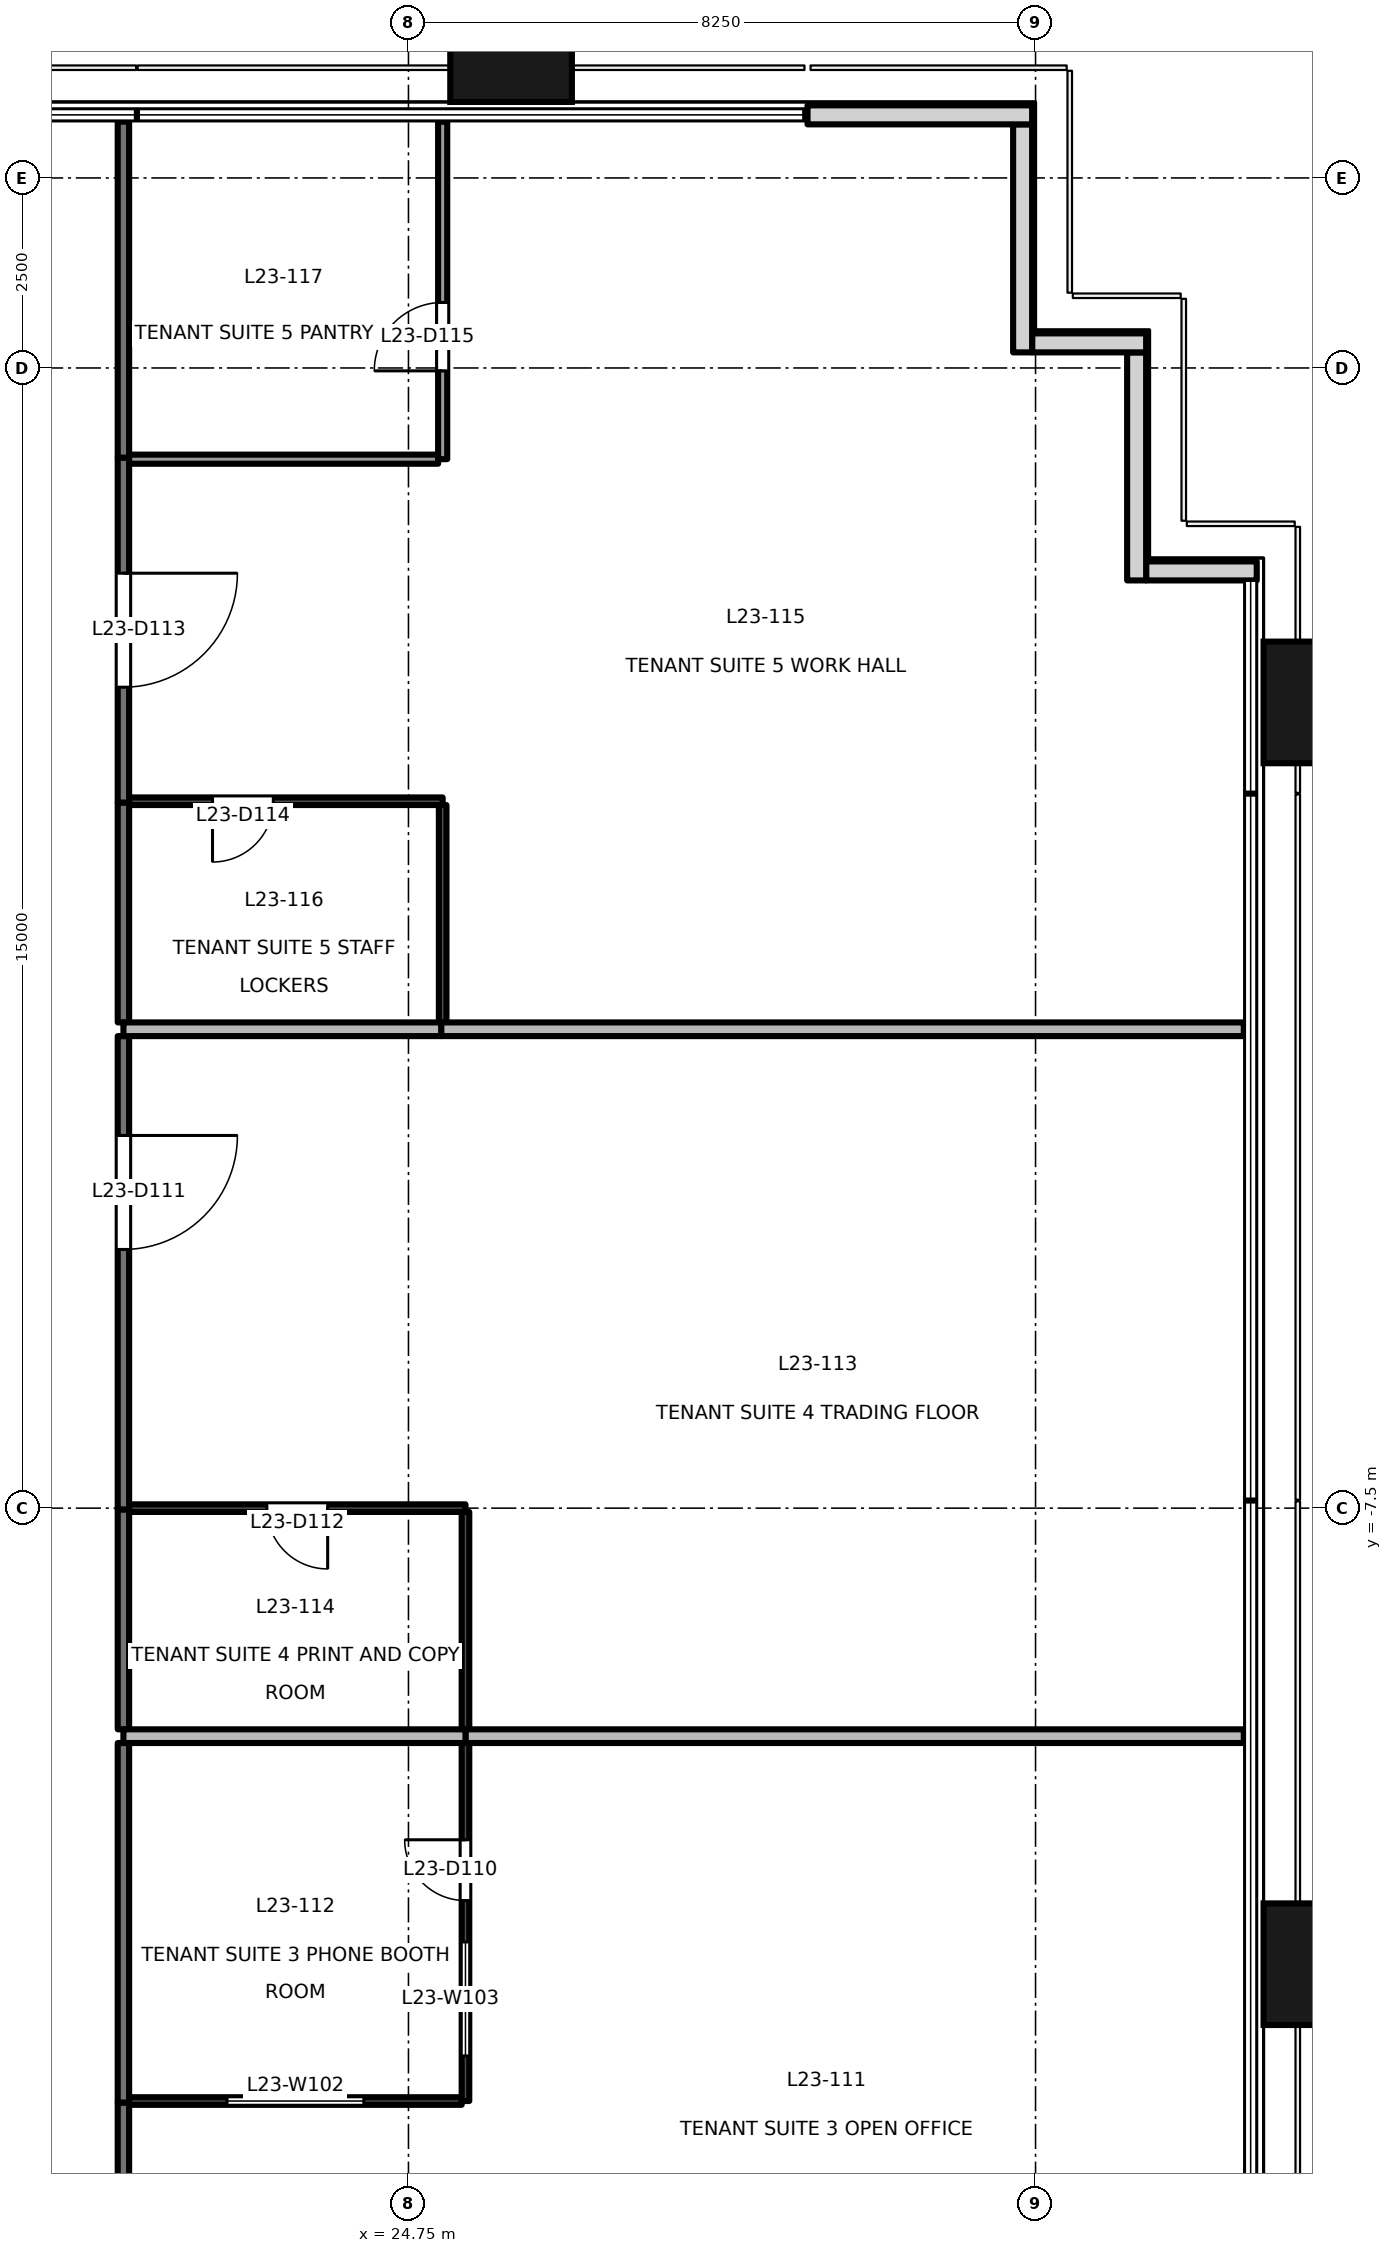
"""IFC4 building model, lengths in metres.
Left out: names, types, materials, properties, quantities, classifications, styles, units other than length and angle.
Written with IfcOpenShell. Run it as: python <this file> out.ifc"""

import sys

from ifc_helpers import new_model, si_unit, direction, frame, frame_2d, origin, origin_2d, place, context, subcontext, project, spatial, rectangle, extrude, element, fill, save


model = new_model("IFC4")
c1 = context("Model", 3, precision=1e-05, world=origin(), true_north=direction((0.0, 1.0)))
c2 = subcontext(c1, "Body", "Model", "MODEL_VIEW")
j1 = project(units=[si_unit("LENGTHUNIT", "METRE"), si_unit("PLANEANGLEUNIT", "RADIAN")], contexts=[c1])
p1 = place(None, origin())
s1 = spatial("IfcSite", under=j1, at=p1, CompositionType="ELEMENT")
p2 = place(p1, origin())
s2 = spatial("IfcBuilding", under=s1, at=p2, CompositionType="ELEMENT")
p3 = place(p2, frame((0.0, 0.0, 103.7)))
s3 = spatial("IfcBuildingStorey", under=s2, at=p3, CompositionType="ELEMENT", Elevation=103.7)
for number, where, z_axis, x_axis in (
    (1, (36.9, -13.5, -0.2), (0.0, 0.0, 1.0), (0.0, 1.0, 0.0)),
    (2, (36.9, 3.1, -0.2), (0.0, 0.0, 1.0), (0.0, 1.0, 0.0)),
    (3, (26.1, 11.9, -0.2), (0.0, 0.0, 1.0), (1.0, 0.0, 0.0)),
):
    element("IfcColumn", number, at=place(p3, frame(where, z_axis=z_axis, x_axis=x_axis)), inside=s3, PredefinedType="COLUMN", context=c2, shape_type="SweptSolid", body=[
        extrude(rectangle(XDim=1.6, YDim=1.8, at=origin_2d()), origin(), (0.0, 0.0, 1.0), 4.0),
    ])
p4 = place(p3, frame((35.91, 4.83, 0.0), z_axis=(0.0, 0.0, 1.0), x_axis=(-1.0, 0.0, 0.0)))
e4 = element("IfcWall", 4, at=p4, inside=s3, PredefinedType="SOLIDWALL", context=c2, shape_type="SweptSolid", body=[
    extrude(rectangle(XDim=1.455, YDim=0.25, at=frame_2d((0.728, 0.0))), origin(), (0.0, 0.0, 1.0), 3.8),
])
p5 = place(p3, frame((34.33, 4.705, 0.0), z_axis=(0.0, 0.0, 1.0), x_axis=(0.0, 1.0, 0.0)))
e5 = element("IfcWall", 5, at=p5, inside=s3, PredefinedType="SOLIDWALL", context=c2, shape_type="SweptSolid", body=[
    extrude(rectangle(XDim=3.0, YDim=0.25, at=frame_2d((1.5, 0.0))), origin(), (0.0, 0.0, 1.0), 3.8),
])
p6 = place(p3, frame((34.455, 7.83, 0.0), z_axis=(0.0, 0.0, 1.0), x_axis=(-1.0, 0.0, 0.0)))
e6 = element("IfcWall", 6, at=p6, inside=s3, PredefinedType="SOLIDWALL", context=c2, shape_type="SweptSolid", body=[
    extrude(rectangle(XDim=1.5, YDim=0.25, at=frame_2d((0.75, 0.0))), origin(), (0.0, 0.0, 1.0), 3.8),
])
p7 = place(p3, frame((32.83, 7.705, 0.0), z_axis=(0.0, 0.0, 1.0), x_axis=(0.0, 1.0, 0.0)))
e7 = element("IfcWall", 7, at=p7, inside=s3, PredefinedType="SOLIDWALL", context=c2, shape_type="SweptSolid", body=[
    extrude(rectangle(XDim=3.0, YDim=0.25, at=frame_2d((1.5, 0.0))), origin(), (0.0, 0.0, 1.0), 3.8),
])
p8 = place(p3, frame((32.955, 10.83, 0.0), z_axis=(0.0, 0.0, 1.0), x_axis=(-1.0, 0.0, 0.0)))
e8 = element("IfcWall", 8, at=p8, inside=s3, PredefinedType="SOLIDWALL", context=c2, shape_type="SweptSolid", body=[
    extrude(rectangle(XDim=2.955, YDim=0.25, at=frame_2d((1.478, 0.0))), origin(), (0.0, 0.0, 1.0), 3.8),
])
p9 = place(p3, frame((21.0, -15.32, 0.0), z_axis=(0.0, 0.0, 1.0), x_axis=(0.0, -1.0, 0.0)))
e9 = element("IfcWall", 9, at=p9, inside=s3, PredefinedType="PARTITIONING", context=c2, shape_type="SweptSolid", body=[
    extrude(rectangle(XDim=4.39, YDim=0.15, at=frame_2d((2.195, 0.0))), origin(), (0.0, 0.0, 1.0), 3.8),
])
p10 = place(p9, frame((1.745, 0.0, 0.0)))
e10 = element("IfcOpeningElement", 10, at=p10, cuts=e9, PredefinedType="OPENING", context=c2, shape_type="SweptSolid", body=[
    extrude(rectangle(XDim=0.9, YDim=2.1, at=frame_2d((0.45, 1.05))), frame((0.0, 0.085, 0.0), z_axis=(0.0, -1.0, 0.0), x_axis=(1.0, 0.0, 0.0)), (0.0, 0.0, 1.0), 0.171),
])
p11 = place(p3, frame((21.0, -10.59, 0.0), z_axis=(0.0, 0.0, 1.0), x_axis=(0.0, -1.0, 0.0)))
e11 = element("IfcWall", 11, at=p11, inside=s3, PredefinedType="PARTITIONING", context=c2, shape_type="SweptSolid", body=[
    extrude(rectangle(XDim=4.73, YDim=0.15, at=frame_2d((2.365, 0.0))), origin(), (0.0, 0.0, 1.0), 2.9),
])
p12 = place(p3, frame((21.0, -1.29, 0.0), z_axis=(0.0, 0.0, 1.0), x_axis=(0.0, -1.0, 0.0)))
e12 = element("IfcWall", 12, at=p12, inside=s3, PredefinedType="PARTITIONING", context=c2, shape_type="SweptSolid", body=[
    extrude(rectangle(XDim=6.23, YDim=0.15, at=frame_2d((3.115, 0.0))), origin(), (0.0, 0.0, 1.0), 2.9),
])
p13 = place(p12, frame((1.307, 0.0, 0.0)))
e13 = element("IfcOpeningElement", 13, at=p13, cuts=e12, PredefinedType="OPENING", context=c2, shape_type="SweptSolid", body=[
    extrude(rectangle(XDim=1.5, YDim=2.1, at=frame_2d((0.75, 1.05))), frame((0.0, 0.085, 0.0), z_axis=(0.0, -1.0, 0.0), x_axis=(1.0, 0.0, 0.0)), (0.0, 0.0, 1.0), 0.171),
])
p14 = place(p3, frame((21.0, -7.52, 0.0), z_axis=(0.0, 0.0, 1.0), x_axis=(0.0, -1.0, 0.0)))
e14 = element("IfcWall", 14, at=p14, inside=s3, PredefinedType="PARTITIONING", context=c2, shape_type="SweptSolid", body=[
    extrude(rectangle(XDim=2.89, YDim=0.15, at=frame_2d((1.445, 0.0))), origin(), (0.0, 0.0, 1.0), 2.9),
])
p15 = place(p3, frame((21.0, 6.32, 0.0), z_axis=(0.0, 0.0, 1.0), x_axis=(0.0, -1.0, 0.0)))
e15 = element("IfcWall", 15, at=p15, inside=s3, PredefinedType="PARTITIONING", context=c2, shape_type="SweptSolid", body=[
    extrude(rectangle(XDim=4.54, YDim=0.15, at=frame_2d((2.27, 0.0))), origin(), (0.0, 0.0, 1.0), 2.9),
])
p16 = place(p15, frame((1.52, 0.0, 0.0)))
e16 = element("IfcOpeningElement", 16, at=p16, cuts=e15, PredefinedType="OPENING", context=c2, shape_type="SweptSolid", body=[
    extrude(rectangle(XDim=1.5, YDim=2.1, at=frame_2d((0.75, 1.05))), frame((0.0, 0.085, 0.0), z_axis=(0.0, -1.0, 0.0), x_axis=(1.0, 0.0, 0.0)), (0.0, 0.0, 1.0), 0.171),
])
p17 = place(p3, frame((21.0, 1.78, 0.0), z_axis=(0.0, 0.0, 1.0), x_axis=(0.0, -1.0, 0.0)))
e17 = element("IfcWall", 17, at=p17, inside=s3, PredefinedType="PARTITIONING", context=c2, shape_type="SweptSolid", body=[
    extrude(rectangle(XDim=2.89, YDim=0.15, at=frame_2d((1.445, 0.0))), origin(), (0.0, 0.0, 1.0), 2.9),
])
p18 = place(p3, frame((21.0, 10.74, 0.0), z_axis=(0.0, 0.0, 1.0), x_axis=(0.0, -1.0, 0.0)))
e18 = element("IfcWall", 18, at=p18, inside=s3, PredefinedType="PARTITIONING", context=c2, shape_type="SweptSolid", body=[
    extrude(rectangle(XDim=4.42, YDim=0.15, at=frame_2d((2.21, 0.0))), origin(), (0.0, 0.0, 1.0), 3.8),
])
p19 = place(p3, frame((21.075, -15.3, 0.0), z_axis=(0.0, 0.0, 1.0), x_axis=(1.0, 0.0, 0.0)))
e19 = element("IfcWall", 19, at=p19, inside=s3, PredefinedType="PARTITIONING", context=c2, shape_type="SweptSolid", body=[
    extrude(rectangle(XDim=4.375, YDim=0.1, at=frame_2d((2.188, 0.0))), origin(), (0.0, 0.0, 1.0), 3.8),
])
p20 = place(p19, frame((1.288, 0.0, 0.9)))
e20 = element("IfcOpeningElement", 20, at=p20, cuts=e19, PredefinedType="OPENING", context=c2, shape_type="SweptSolid", body=[
    extrude(rectangle(XDim=1.8, YDim=1.2, at=frame_2d((0.9, 0.6))), frame((0.0, 0.061, 0.0), z_axis=(0.0, -1.0, 0.0), x_axis=(1.0, 0.0, 0.0)), (0.0, 0.0, 1.0), 0.121),
])
p21 = place(p3, frame((25.5, -15.3, 0.0), z_axis=(0.0, 0.0, 1.0), x_axis=(0.0, 1.0, 0.0)))
e21 = element("IfcWall", 21, at=p21, inside=s3, PredefinedType="PARTITIONING", context=c2, shape_type="SweptSolid", body=[
    extrude(rectangle(XDim=4.71, YDim=0.1, at=frame_2d((2.355, 0.0))), origin(), (0.0, 0.0, 1.0), 2.9),
])
p22 = place(p21, frame((2.637, 0.0, 0.0)))
e22 = element("IfcOpeningElement", 22, at=p22, cuts=e21, PredefinedType="OPENING", context=c2, shape_type="SweptSolid", body=[
    extrude(rectangle(XDim=0.8, YDim=2.1, at=frame_2d((0.4, 1.05))), frame((0.0, 0.061, 0.0), z_axis=(0.0, -1.0, 0.0), x_axis=(1.0, 0.0, 0.0)), (0.0, 0.0, 1.0), 0.121),
])
p23 = place(p21, frame((0.593, 0.0, 0.9)))
e23 = element("IfcOpeningElement", 23, at=p23, cuts=e21, PredefinedType="OPENING", context=c2, shape_type="SweptSolid", body=[
    extrude(rectangle(XDim=1.5, YDim=1.2, at=frame_2d((0.75, 0.6))), frame((0.0, 0.061, 0.0), z_axis=(0.0, -1.0, 0.0), x_axis=(1.0, 0.0, 0.0)), (0.0, 0.0, 1.0), 0.121),
])
p24 = place(p3, frame((25.5, -10.5, 0.0), z_axis=(0.0, 0.0, 1.0), x_axis=(1.0, 0.0, 0.0)))
e24 = element("IfcWall", 24, at=p24, inside=s3, PredefinedType="PARTITIONING", context=c2, shape_type="SweptSolid", body=[
    extrude(rectangle(XDim=10.24, YDim=0.18, at=frame_2d((5.12, 0.0))), origin(), (0.0, 0.0, 1.0), 3.8),
])
p25 = place(p3, frame((21.0, -10.5, 0.0), z_axis=(0.0, 0.0, 1.0), x_axis=(1.0, 0.0, 0.0)))
e25 = element("IfcWall", 25, at=p25, inside=s3, PredefinedType="PARTITIONING", context=c2, shape_type="SweptSolid", body=[
    extrude(rectangle(XDim=4.5, YDim=0.18, at=frame_2d((2.25, 0.0))), origin(), (0.0, 0.0, 1.0), 3.8),
])
p26 = place(p3, frame((25.5, -7.5, 0.0), z_axis=(0.0, 0.0, 1.0), x_axis=(-1.0, 0.0, 0.0)))
e26 = element("IfcWall", 26, at=p26, inside=s3, PredefinedType="PARTITIONING", context=c2, shape_type="SweptSolid", body=[
    extrude(rectangle(XDim=4.425, YDim=0.1, at=frame_2d((2.212, 0.0))), origin(), (0.0, 0.0, 1.0), 3.8),
])
p27 = place(p26, frame((1.813, 0.0, 0.0)))
e27 = element("IfcOpeningElement", 27, at=p27, cuts=e26, PredefinedType="OPENING", context=c2, shape_type="SweptSolid", body=[
    extrude(rectangle(XDim=0.8, YDim=2.1, at=frame_2d((0.4, 1.05))), frame((0.0, 0.061, 0.0), z_axis=(0.0, -1.0, 0.0), x_axis=(1.0, 0.0, 0.0)), (0.0, 0.0, 1.0), 0.121),
])
p28 = place(p3, frame((25.5, -10.41, 0.0), z_axis=(0.0, 0.0, 1.0), x_axis=(0.0, 1.0, 0.0)))
e28 = element("IfcWall", 28, at=p28, inside=s3, PredefinedType="PARTITIONING", context=c2, shape_type="SweptSolid", body=[
    extrude(rectangle(XDim=2.86, YDim=0.1, at=frame_2d((1.43, 0.0))), origin(), (0.0, 0.0, 1.0), 2.9),
])
p29 = place(p3, frame((25.18, -1.2, 0.0), z_axis=(0.0, 0.0, 1.0), x_axis=(1.0, 0.0, 0.0)))
e29 = element("IfcWall", 29, at=p29, inside=s3, PredefinedType="PARTITIONING", context=c2, shape_type="SweptSolid", body=[
    extrude(rectangle(XDim=10.56, YDim=0.18, at=frame_2d((5.28, 0.0))), origin(), (0.0, 0.0, 1.0), 3.8),
])
p30 = place(p3, frame((21.0, -1.2, 0.0), z_axis=(0.0, 0.0, 1.0), x_axis=(1.0, 0.0, 0.0)))
e30 = element("IfcWall", 30, at=p30, inside=s3, PredefinedType="PARTITIONING", context=c2, shape_type="SweptSolid", body=[
    extrude(rectangle(XDim=4.18, YDim=0.18, at=frame_2d((2.09, 0.0))), origin(), (0.0, 0.0, 1.0), 3.8),
])
p31 = place(p3, frame((25.2, 1.8, 0.0), z_axis=(0.0, 0.0, 1.0), x_axis=(-1.0, 0.0, 0.0)))
e31 = element("IfcWall", 31, at=p31, inside=s3, PredefinedType="PARTITIONING", context=c2, shape_type="SweptSolid", body=[
    extrude(rectangle(XDim=4.125, YDim=0.1, at=frame_2d((2.062, 0.0))), origin(), (0.0, 0.0, 1.0), 3.8),
])
p32 = place(p31, frame((2.228, 0.0, 0.0)))
e32 = element("IfcOpeningElement", 32, at=p32, cuts=e31, PredefinedType="OPENING", context=c2, shape_type="SweptSolid", body=[
    extrude(rectangle(XDim=0.8, YDim=2.1, at=frame_2d((0.4, 1.05))), frame((0.0, 0.061, 0.0), z_axis=(0.0, -1.0, 0.0), x_axis=(1.0, 0.0, 0.0)), (0.0, 0.0, 1.0), 0.121),
])
p33 = place(p3, frame((25.2, -1.11, 0.0), z_axis=(0.0, 0.0, 1.0), x_axis=(0.0, 1.0, 0.0)))
e33 = element("IfcWall", 33, at=p33, inside=s3, PredefinedType="PARTITIONING", context=c2, shape_type="SweptSolid", body=[
    extrude(rectangle(XDim=2.86, YDim=0.1, at=frame_2d((1.43, 0.0))), origin(), (0.0, 0.0, 1.0), 2.9),
])
p34 = place(p3, frame((21.075, 6.3, 0.0), z_axis=(0.0, 0.0, 1.0), x_axis=(1.0, 0.0, 0.0)))
e34 = element("IfcWall", 34, at=p34, inside=s3, PredefinedType="PARTITIONING", context=c2, shape_type="SweptSolid", body=[
    extrude(rectangle(XDim=4.065, YDim=0.12, at=frame_2d((2.032, 0.0))), origin(), (0.0, 0.0, 1.0), 3.8),
])
p35 = place(p3, frame((25.2, 6.3, 0.0), z_axis=(0.0, 0.0, 1.0), x_axis=(0.0, 1.0, 0.0)))
e35 = element("IfcWall", 35, at=p35, inside=s3, PredefinedType="PARTITIONING", context=c2, shape_type="SweptSolid", body=[
    extrude(rectangle(XDim=4.44, YDim=0.12, at=frame_2d((2.22, 0.0))), origin(), (0.0, 0.0, 1.0), 3.8),
])
p36 = place(p35, frame((1.162, 0.0, 0.0)))
e36 = element("IfcOpeningElement", 36, at=p36, cuts=e35, PredefinedType="OPENING", context=c2, shape_type="SweptSolid", body=[
    extrude(rectangle(XDim=0.9, YDim=2.1, at=frame_2d((0.45, 1.05))), frame((0.0, 0.071, 0.0), z_axis=(0.0, -1.0, 0.0), x_axis=(1.0, 0.0, 0.0)), (0.0, 0.0, 1.0), 0.141),
])
p37 = place(p22, origin())
e37 = element("IfcDoor", 37, at=p37, inside=s3, OperationType="SINGLE_SWING_RIGHT", PredefinedType="DOOR", context=c2, shape_type="SweptSolid", body=[
    extrude(rectangle(XDim=0.8, YDim=2.1, at=frame_2d((0.4, 1.05))), frame((0.0, 0.025, 0.0), z_axis=(0.0, -1.0, 0.0), x_axis=(1.0, 0.0, 0.0)), (0.0, 0.0, 1.0), 0.05),
])
fill(e22, e37)
p38 = place(p13, origin())
e38 = element("IfcDoor", 38, at=p38, inside=s3, OperationType="DOUBLE_DOOR_SINGLE_SWING", PredefinedType="DOOR", context=c2, shape_type="SweptSolid", body=[
    extrude(rectangle(XDim=1.5, YDim=2.1, at=frame_2d((0.75, 1.05))), frame((0.0, 0.025, 0.0), z_axis=(0.0, -1.0, 0.0), x_axis=(1.0, 0.0, 0.0)), (0.0, 0.0, 1.0), 0.05),
])
fill(e13, e38)
p39 = place(p27, origin())
e39 = element("IfcDoor", 39, at=p39, inside=s3, OperationType="SINGLE_SWING_LEFT", PredefinedType="DOOR", context=c2, shape_type="SweptSolid", body=[
    extrude(rectangle(XDim=0.8, YDim=2.1, at=frame_2d((0.4, 1.05))), frame((0.0, 0.025, 0.0), z_axis=(0.0, -1.0, 0.0), x_axis=(1.0, 0.0, 0.0)), (0.0, 0.0, 1.0), 0.05),
])
fill(e27, e39)
p40 = place(p16, origin())
e40 = element("IfcDoor", 40, at=p40, inside=s3, OperationType="DOUBLE_DOOR_SINGLE_SWING", PredefinedType="DOOR", context=c2, shape_type="SweptSolid", body=[
    extrude(rectangle(XDim=1.5, YDim=2.1, at=frame_2d((0.75, 1.05))), frame((0.0, 0.025, 0.0), z_axis=(0.0, -1.0, 0.0), x_axis=(1.0, 0.0, 0.0)), (0.0, 0.0, 1.0), 0.05),
])
fill(e16, e40)
p41 = place(p32, origin())
e41 = element("IfcDoor", 41, at=p41, inside=s3, OperationType="SINGLE_SWING_RIGHT", PredefinedType="DOOR", context=c2, shape_type="SweptSolid", body=[
    extrude(rectangle(XDim=0.8, YDim=2.1, at=frame_2d((0.4, 1.05))), frame((0.0, 0.025, 0.0), z_axis=(0.0, -1.0, 0.0), x_axis=(1.0, 0.0, 0.0)), (0.0, 0.0, 1.0), 0.05),
])
fill(e32, e41)
p42 = place(p36, origin())
e42 = element("IfcDoor", 42, at=p42, inside=s3, OperationType="SINGLE_SWING_LEFT", PredefinedType="DOOR", context=c2, shape_type="SweptSolid", body=[
    extrude(rectangle(XDim=0.9, YDim=2.1, at=frame_2d((0.45, 1.05))), frame((0.0, 0.025, 0.0), z_axis=(0.0, -1.0, 0.0), x_axis=(1.0, 0.0, 0.0)), (0.0, 0.0, 1.0), 0.05),
])
fill(e36, e42)
p43 = place(p20, origin())
e43 = element("IfcWindow", 43, at=p43, inside=s3, PartitioningType="SINGLE_PANEL", PredefinedType="WINDOW", context=c2, shape_type="SweptSolid", body=[
    extrude(rectangle(XDim=1.8, YDim=1.2, at=frame_2d((0.9, 0.6))), frame((0.0, 0.03, 0.0), z_axis=(0.0, -1.0, 0.0), x_axis=(1.0, 0.0, 0.0)), (0.0, 0.0, 1.0), 0.06),
])
fill(e20, e43)
p44 = place(p23, origin())
e44 = element("IfcWindow", 44, at=p44, inside=s3, PartitioningType="SINGLE_PANEL", PredefinedType="WINDOW", context=c2, shape_type="SweptSolid", body=[
    extrude(rectangle(XDim=1.5, YDim=1.2, at=frame_2d((0.75, 0.6))), frame((0.0, 0.03, 0.0), z_axis=(0.0, -1.0, 0.0), x_axis=(1.0, 0.0, 0.0)), (0.0, 0.0, 1.0), 0.06),
])
fill(e23, e44)
save(model, sys.argv[1])
